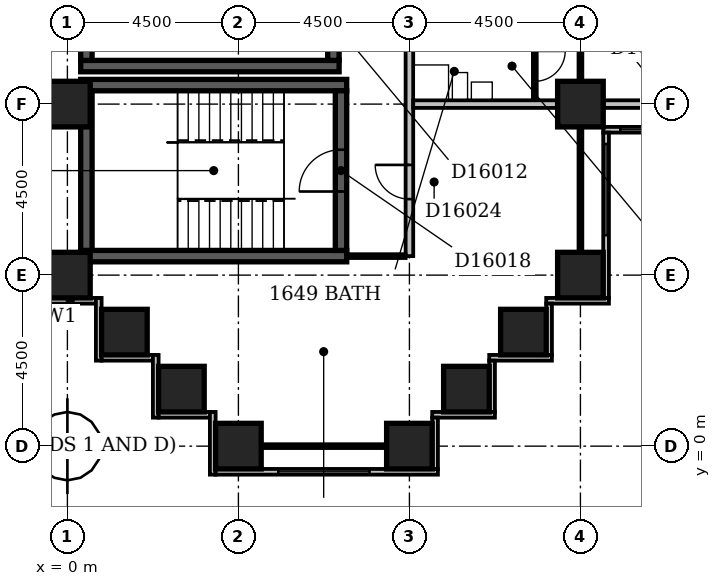
"""IFC4 building model, lengths in metres.
Left out: names, types, materials, properties, quantities, classifications, styles, units other than length and angle.
Written with IfcOpenShell. Run it as: python <this file> out.ifc"""

import sys

from ifc_helpers import new_model, si_unit, direction, frame, frame_2d, origin, origin_2d, place, context, subcontext, project, spatial, rectangle, extrude, element, fill, save


model = new_model("IFC4")
c1 = context("Model", 3, precision=1e-05, world=origin(), true_north=direction((0.0, 1.0)))
c2 = subcontext(c1, "Body", "Model", "MODEL_VIEW")
j1 = project(units=[si_unit("LENGTHUNIT", "METRE"), si_unit("PLANEANGLEUNIT", "RADIAN")], contexts=[c1])
p1 = place(None, origin())
s1 = spatial("IfcSite", under=j1, at=p1, CompositionType="ELEMENT")
p2 = place(p1, origin())
s2 = spatial("IfcBuilding", under=s1, at=p2, CompositionType="ELEMENT")
p3 = place(p2, frame((0.0, 0.0, 68.6)))
s3 = spatial("IfcBuildingStorey", under=s2, at=p3, CompositionType="ELEMENT", Elevation=68.6)
for number, where, z_axis, x_axis in (
    (1, (0.35, 5.0, -0.3), (0.0, 0.0, 1.0), (1.0, 0.0, 0.0)),
    (2, (0.35, 9.5, -0.3), (0.0, 0.0, 1.0), (1.0, 0.0, 0.0)),
):
    element("IfcWall", number, at=place(p3, frame(where, z_axis=z_axis, x_axis=x_axis)), inside=s3, PredefinedType="SHEAR", context=c2, shape_type="SweptSolid", body=[
        extrude(rectangle(XDim=7.0, YDim=0.3, at=frame_2d((3.5, 0.0))), origin(), (0.0, 0.0, 1.0), 3.6),
    ])
p4 = place(p3, frame((0.35, 10.0, -0.3), z_axis=(0.0, 0.0, 1.0), x_axis=(1.0, 0.0, 0.0)))
e3 = element("IfcWall", 3, at=p4, inside=s3, PredefinedType="SHEAR", context=c2, shape_type="SweptSolid", body=[
    extrude(rectangle(XDim=6.8, YDim=0.3, at=frame_2d((3.4, 0.0))), origin(), (0.0, 0.0, 1.0), 3.6),
])
p5 = place(p3, frame((0.5, 5.15, -0.3), z_axis=(0.0, 0.0, 1.0), x_axis=(0.0, 1.0, 0.0)))
e4 = element("IfcWall", 4, at=p5, inside=s3, PredefinedType="SHEAR", context=c2, shape_type="SweptSolid", body=[
    extrude(rectangle(XDim=4.2, YDim=0.3, at=frame_2d((2.1, 0.0))), origin(), (0.0, 0.0, 1.0), 3.6),
])
p6 = place(p3, frame((0.5, 10.15, -0.3), z_axis=(0.0, 0.0, 1.0), x_axis=(0.0, 1.0, 0.0)))
e5 = element("IfcWall", 5, at=p6, inside=s3, PredefinedType="SHEAR", context=c2, shape_type="SweptSolid", body=[
    extrude(rectangle(XDim=3.7, YDim=0.3, at=frame_2d((1.85, 0.0))), origin(), (0.0, 0.0, 1.0), 3.6),
])
p7 = place(p3, frame((7.0, 10.15, -0.3), z_axis=(0.0, 0.0, 1.0), x_axis=(0.0, 1.0, 0.0)))
e6 = element("IfcWall", 6, at=p7, inside=s3, PredefinedType="SHEAR", context=c2, shape_type="SweptSolid", body=[
    extrude(rectangle(XDim=3.7, YDim=0.3, at=frame_2d((1.85, 0.0))), origin(), (0.0, 0.0, 1.0), 3.6),
])
p8 = place(p7, frame((1.35, 0.0, 0.3)))
e7 = element("IfcOpeningElement", 7, at=p8, cuts=e6, PredefinedType="OPENING", context=c2, shape_type="SweptSolid", body=[
    extrude(rectangle(XDim=1.0, YDim=2.1, at=frame_2d((0.5, 1.05))), frame((0.0, 0.162, 0.0), z_axis=(0.0, -1.0, 0.0), x_axis=(1.0, 0.0, 0.0)), (0.0, 0.0, 1.0), 0.324),
])
p9 = place(p3, frame((7.2, 5.15, -0.3), z_axis=(0.0, 0.0, 1.0), x_axis=(0.0, 1.0, 0.0)))
e8 = element("IfcWall", 8, at=p9, inside=s3, PredefinedType="SHEAR", context=c2, shape_type="SweptSolid", body=[
    extrude(rectangle(XDim=4.2, YDim=0.3, at=frame_2d((2.1, 0.0))), origin(), (0.0, 0.0, 1.0), 3.6),
])
p10 = place(p9, frame((1.55, 0.0, 0.3)))
e9 = element("IfcOpeningElement", 9, at=p10, cuts=e8, PredefinedType="OPENING", context=c2, shape_type="SweptSolid", body=[
    extrude(rectangle(XDim=1.1, YDim=2.1, at=frame_2d((0.55, 1.05))), frame((0.0, 0.162, 0.0), z_axis=(0.0, -1.0, 0.0), x_axis=(1.0, 0.0, 0.0)), (0.0, 0.0, 1.0), 0.324),
])
for number, where, z_axis, x_axis in (
    (10, (4.5, 0.0, -0.3), (0.0, 0.0, 1.0), (1.0, 0.0, 0.0)),
    (11, (9.0, 0.0, -0.3), (0.0, 0.0, 1.0), (1.0, 0.0, 0.0)),
    (12, (3.0, 1.5, -0.3), (0.0, 0.0, 1.0), (1.0, 0.0, 0.0)),
    (13, (10.5, 1.5, -0.3), (0.0, 0.0, 1.0), (1.0, 0.0, 0.0)),
    (14, (1.5, 3.0, -0.3), (0.0, 0.0, 1.0), (1.0, 0.0, 0.0)),
    (15, (12.0, 3.0, -0.3), (0.0, 0.0, 1.0), (1.0, 0.0, 0.0)),
    (16, (0.0, 4.5, -0.3), (0.0, 0.0, 1.0), (1.0, 0.0, 0.0)),
    (17, (13.5, 4.5, -0.3), (0.0, 0.0, 1.0), (1.0, 0.0, 0.0)),
    (18, (0.0, 9.0, -0.3), (0.0, 0.0, 1.0), (1.0, 0.0, 0.0)),
    (19, (13.5, 9.0, -0.3), (0.0, 0.0, 1.0), (1.0, 0.0, 0.0)),
):
    element("IfcColumn", number, at=place(p3, frame(where, z_axis=z_axis, x_axis=x_axis)), inside=s3, PredefinedType="COLUMN", context=c2, shape_type="SweptSolid", body=[
        extrude(rectangle(XDim=1.2, YDim=1.2, at=origin_2d()), origin(), (0.0, 0.0, 1.0), 3.6),
    ])
p11 = place(p3, frame((9.675, -0.6, 0.0), z_axis=(0.0, 0.0, 1.0), x_axis=(0.0, 1.0, 0.0)))
e20 = element("IfcWall", 20, at=p11, inside=s3, PredefinedType="STANDARD", context=c2, shape_type="SweptSolid", body=[
    extrude(rectangle(XDim=1.35, YDim=0.15, at=frame_2d((0.675, 0.0))), origin(), (0.0, 0.0, 1.0), 2.7),
])
p12 = place(p3, frame((9.6, 0.825, 0.0), z_axis=(0.0, 0.0, 1.0), x_axis=(1.0, 0.0, 0.0)))
e21 = element("IfcWall", 21, at=p12, inside=s3, PredefinedType="STANDARD", context=c2, shape_type="SweptSolid", body=[
    extrude(rectangle(XDim=1.65, YDim=0.15, at=frame_2d((0.825, 0.0))), origin(), (0.0, 0.0, 1.0), 2.7),
])
p13 = place(p3, frame((11.175, 0.9, 0.0), z_axis=(0.0, 0.0, 1.0), x_axis=(0.0, 1.0, 0.0)))
e22 = element("IfcWall", 22, at=p13, inside=s3, PredefinedType="STANDARD", context=c2, shape_type="SweptSolid", body=[
    extrude(rectangle(XDim=1.35, YDim=0.15, at=frame_2d((0.675, 0.0))), origin(), (0.0, 0.0, 1.0), 2.7),
])
p14 = place(p3, frame((11.1, 2.325, 0.0), z_axis=(0.0, 0.0, 1.0), x_axis=(1.0, 0.0, 0.0)))
e23 = element("IfcWall", 23, at=p14, inside=s3, PredefinedType="STANDARD", context=c2, shape_type="SweptSolid", body=[
    extrude(rectangle(XDim=1.65, YDim=0.15, at=frame_2d((0.825, 0.0))), origin(), (0.0, 0.0, 1.0), 2.7),
])
p15 = place(p3, frame((12.675, 2.4, 0.0), z_axis=(0.0, 0.0, 1.0), x_axis=(0.0, 1.0, 0.0)))
e24 = element("IfcWall", 24, at=p15, inside=s3, PredefinedType="STANDARD", context=c2, shape_type="SweptSolid", body=[
    extrude(rectangle(XDim=1.35, YDim=0.15, at=frame_2d((0.675, 0.0))), origin(), (0.0, 0.0, 1.0), 2.7),
])
p16 = place(p3, frame((12.6, 3.825, 0.0), z_axis=(0.0, 0.0, 1.0), x_axis=(1.0, 0.0, 0.0)))
e25 = element("IfcWall", 25, at=p16, inside=s3, PredefinedType="STANDARD", context=c2, shape_type="SweptSolid", body=[
    extrude(rectangle(XDim=1.65, YDim=0.15, at=frame_2d((0.825, 0.0))), origin(), (0.0, 0.0, 1.0), 2.7),
])
p17 = place(p3, frame((14.175, 3.9, 0.0), z_axis=(0.0, 0.0, 1.0), x_axis=(0.0, 1.0, 0.0)))
e26 = element("IfcWall", 26, at=p17, inside=s3, PredefinedType="STANDARD", context=c2, shape_type="SweptSolid", body=[
    extrude(rectangle(XDim=4.35, YDim=0.15, at=frame_2d((2.175, 0.0))), origin(), (0.0, 0.0, 1.0), 2.7),
])
p18 = place(p17, frame((1.65, 0.0, 0.6)))
e27 = element("IfcOpeningElement", 27, at=p18, cuts=e26, PredefinedType="OPENING", context=c2, shape_type="SweptSolid", body=[
    extrude(rectangle(XDim=2.4, YDim=1.8, at=frame_2d((1.2, 0.9))), frame((0.0, 0.087, 0.0), z_axis=(0.0, -1.0, 0.0), x_axis=(1.0, 0.0, 0.0)), (0.0, 0.0, 1.0), 0.174),
])
p19 = place(p3, frame((14.1, 8.325, 0.0), z_axis=(0.0, 0.0, 1.0), x_axis=(1.0, 0.0, 0.0)))
e28 = element("IfcWall", 28, at=p19, inside=s3, PredefinedType="STANDARD", context=c2, shape_type="SweptSolid", body=[
    extrude(rectangle(XDim=4.65, YDim=0.15, at=frame_2d((2.325, 0.0))), origin(), (0.0, 0.0, 1.0), 2.7),
])
p20 = place(p19, frame((0.45, 0.0, 0.6)))
e29 = element("IfcOpeningElement", 29, at=p20, cuts=e28, PredefinedType="OPENING", context=c2, shape_type="SweptSolid", body=[
    extrude(rectangle(XDim=2.4, YDim=1.8, at=frame_2d((1.2, 0.9))), frame((0.0, 0.087, 0.0), z_axis=(0.0, -1.0, 0.0), x_axis=(1.0, 0.0, 0.0)), (0.0, 0.0, 1.0), 0.174),
])
p21 = place(p3, frame((-0.6, 3.825, 0.0), z_axis=(0.0, 0.0, 1.0), x_axis=(1.0, 0.0, 0.0)))
e30 = element("IfcWall", 30, at=p21, inside=s3, PredefinedType="STANDARD", context=c2, shape_type="SweptSolid", body=[
    extrude(rectangle(XDim=1.35, YDim=0.15, at=frame_2d((0.675, 0.0))), origin(), (0.0, 0.0, 1.0), 2.7),
])
p22 = place(p3, frame((0.825, 3.9, 0.0), z_axis=(0.0, 0.0, 1.0), x_axis=(0.0, -1.0, 0.0)))
e31 = element("IfcWall", 31, at=p22, inside=s3, PredefinedType="STANDARD", context=c2, shape_type="SweptSolid", body=[
    extrude(rectangle(XDim=1.65, YDim=0.15, at=frame_2d((0.825, 0.0))), origin(), (0.0, 0.0, 1.0), 2.7),
])
p23 = place(p3, frame((0.9, 2.325, 0.0), z_axis=(0.0, 0.0, 1.0), x_axis=(1.0, 0.0, 0.0)))
e32 = element("IfcWall", 32, at=p23, inside=s3, PredefinedType="STANDARD", context=c2, shape_type="SweptSolid", body=[
    extrude(rectangle(XDim=1.35, YDim=0.15, at=frame_2d((0.675, 0.0))), origin(), (0.0, 0.0, 1.0), 2.7),
])
p24 = place(p3, frame((2.325, 2.4, 0.0), z_axis=(0.0, 0.0, 1.0), x_axis=(0.0, -1.0, 0.0)))
e33 = element("IfcWall", 33, at=p24, inside=s3, PredefinedType="STANDARD", context=c2, shape_type="SweptSolid", body=[
    extrude(rectangle(XDim=1.65, YDim=0.15, at=frame_2d((0.825, 0.0))), origin(), (0.0, 0.0, 1.0), 2.7),
])
p25 = place(p3, frame((2.4, 0.825, 0.0), z_axis=(0.0, 0.0, 1.0), x_axis=(1.0, 0.0, 0.0)))
e34 = element("IfcWall", 34, at=p25, inside=s3, PredefinedType="STANDARD", context=c2, shape_type="SweptSolid", body=[
    extrude(rectangle(XDim=1.35, YDim=0.15, at=frame_2d((0.675, 0.0))), origin(), (0.0, 0.0, 1.0), 2.7),
])
p26 = place(p3, frame((3.825, 0.9, 0.0), z_axis=(0.0, 0.0, 1.0), x_axis=(0.0, -1.0, 0.0)))
e35 = element("IfcWall", 35, at=p26, inside=s3, PredefinedType="STANDARD", context=c2, shape_type="SweptSolid", body=[
    extrude(rectangle(XDim=1.65, YDim=0.15, at=frame_2d((0.825, 0.0))), origin(), (0.0, 0.0, 1.0), 2.7),
])
p27 = place(p3, frame((3.9, -0.675, 0.0), z_axis=(0.0, 0.0, 1.0), x_axis=(1.0, 0.0, 0.0)))
e36 = element("IfcWall", 36, at=p27, inside=s3, PredefinedType="STANDARD", context=c2, shape_type="SweptSolid", body=[
    extrude(rectangle(XDim=5.85, YDim=0.15, at=frame_2d((2.925, 0.0))), origin(), (0.0, 0.0, 1.0), 2.7),
])
p28 = place(p27, frame((1.65, 0.0, 0.6)))
e37 = element("IfcOpeningElement", 37, at=p28, cuts=e36, PredefinedType="OPENING", context=c2, shape_type="SweptSolid", body=[
    extrude(rectangle(XDim=2.4, YDim=1.8, at=frame_2d((1.2, 0.9))), frame((0.0, 0.087, 0.0), z_axis=(0.0, -1.0, 0.0), x_axis=(1.0, 0.0, 0.0)), (0.0, 0.0, 1.0), 0.174),
])
p29 = place(p3, frame((5.1, 0.0, 0.0), z_axis=(0.0, 0.0, 1.0), x_axis=(1.0, 0.0, 0.0)))
e38 = element("IfcWall", 38, at=p29, inside=s3, PredefinedType="PARTITIONING", context=c2, shape_type="SweptSolid", body=[
    extrude(rectangle(XDim=3.3, YDim=0.1, at=frame_2d((1.65, 0.0))), origin(), (0.0, 0.0, 1.0), 2.7),
])
p30 = place(p3, frame((0.0, 4.4, 0.0), z_axis=(0.0, 0.0, 1.0), x_axis=(0.0, 1.0, 0.0)))
e39 = element("IfcWall", 39, at=p30, inside=s3, PredefinedType="PARTITIONING", context=c2, shape_type="SweptSolid", body=[
    extrude(rectangle(XDim=0.7, YDim=0.1, at=frame_2d((0.35, 0.0))), origin(), (0.0, 0.0, 1.0), 2.7),
])
p31 = place(p3, frame((7.349, 5.0, 0.0), z_axis=(0.0, 0.0, 1.0), x_axis=(1.0, 0.0, 0.0)))
e40 = element("IfcWall", 40, at=p31, inside=s3, PredefinedType="PARTITIONING", context=c2, shape_type="SweptSolid", body=[
    extrude(rectangle(XDim=1.551, YDim=0.1, at=frame_2d((0.775, 0.0))), origin(), (0.0, 0.0, 1.0), 3.3),
])
p32 = place(p3, frame((9.0, 5.0, 0.0), z_axis=(0.0, 0.0, 1.0), x_axis=(0.0, 1.0, 0.0)))
e41 = element("IfcWall", 41, at=p32, inside=s3, PredefinedType="PARTITIONING", context=c2, shape_type="SweptSolid", body=[
    extrude(rectangle(XDim=44.5, YDim=0.2, at=frame_2d((22.25, 0.0))), origin(), (0.0, 0.0, 1.0), 3.3),
])
p33 = place(p32, frame((22.3, 0.0, 0.0)))
e42 = element("IfcOpeningElement", 42, at=p33, cuts=e41, PredefinedType="OPENING", context=c2, shape_type="SweptSolid", body=[
    extrude(rectangle(XDim=1.0, YDim=2.1, at=frame_2d((0.5, 1.05))), frame((0.0, 0.112, 0.0), z_axis=(0.0, -1.0, 0.0), x_axis=(1.0, 0.0, 0.0)), (0.0, 0.0, 1.0), 0.224),
])
p34 = place(p32, frame((15.7, 0.0, 0.0)))
e43 = element("IfcOpeningElement", 43, at=p34, cuts=e41, PredefinedType="OPENING", context=c2, shape_type="SweptSolid", body=[
    extrude(rectangle(XDim=1.0, YDim=2.1, at=frame_2d((0.5, 1.05))), frame((0.0, 0.112, 0.0), z_axis=(0.0, -1.0, 0.0), x_axis=(1.0, 0.0, 0.0)), (0.0, 0.0, 1.0), 0.224),
])
p35 = place(p32, frame((10.45, 0.0, 0.0)))
e44 = element("IfcOpeningElement", 44, at=p35, cuts=e41, PredefinedType="OPENING", context=c2, shape_type="SweptSolid", body=[
    extrude(rectangle(XDim=1.0, YDim=2.1, at=frame_2d((0.5, 1.05))), frame((0.0, 0.112, 0.0), z_axis=(0.0, -1.0, 0.0), x_axis=(1.0, 0.0, 0.0)), (0.0, 0.0, 1.0), 0.224),
])
p36 = place(p32, frame((5.95, 0.0, 0.0)))
e45 = element("IfcOpeningElement", 45, at=p36, cuts=e41, PredefinedType="OPENING", context=c2, shape_type="SweptSolid", body=[
    extrude(rectangle(XDim=1.0, YDim=2.1, at=frame_2d((0.5, 1.05))), frame((0.0, 0.112, 0.0), z_axis=(0.0, -1.0, 0.0), x_axis=(1.0, 0.0, 0.0)), (0.0, 0.0, 1.0), 0.224),
])
p37 = place(p32, frame((37.25, 0.0, 0.0)))
e46 = element("IfcOpeningElement", 46, at=p37, cuts=e41, PredefinedType="OPENING", context=c2, shape_type="SweptSolid", body=[
    extrude(rectangle(XDim=0.9, YDim=2.1, at=frame_2d((0.45, 1.05))), frame((0.0, 0.112, 0.0), z_axis=(0.0, -1.0, 0.0), x_axis=(1.0, 0.0, 0.0)), (0.0, 0.0, 1.0), 0.224),
])
p38 = place(p32, frame((1.5, 0.0, 0.0)))
e47 = element("IfcOpeningElement", 47, at=p38, cuts=e41, PredefinedType="OPENING", context=c2, shape_type="SweptSolid", body=[
    extrude(rectangle(XDim=0.9, YDim=2.1, at=frame_2d((0.45, 1.05))), frame((0.0, 0.112, 0.0), z_axis=(0.0, -1.0, 0.0), x_axis=(1.0, 0.0, 0.0)), (0.0, 0.0, 1.0), 0.224),
])
p39 = place(p3, frame((13.5, 5.1, 0.0), z_axis=(0.0, 0.0, 1.0), x_axis=(0.0, 1.0, 0.0)))
e48 = element("IfcWall", 48, at=p39, inside=s3, PredefinedType="PARTITIONING", context=c2, shape_type="SweptSolid", body=[
    extrude(rectangle(XDim=3.3, YDim=0.1, at=frame_2d((1.65, 0.0))), origin(), (0.0, 0.0, 1.0), 2.7),
])
p40 = place(p3, frame((9.1, 9.0, 0.0), z_axis=(0.0, 0.0, 1.0), x_axis=(1.0, 0.0, 0.0)))
e49 = element("IfcWall", 49, at=p40, inside=s3, PredefinedType="PARTITIONING", context=c2, shape_type="SweptSolid", body=[
    extrude(rectangle(XDim=3.8, YDim=0.2, at=frame_2d((1.9, 0.0))), origin(), (0.0, 0.0, 1.0), 3.3),
])
p41 = place(p3, frame((14.1, 9.0, 0.0), z_axis=(0.0, 0.0, 1.0), x_axis=(1.0, 0.0, 0.0)))
e50 = element("IfcWall", 50, at=p41, inside=s3, PredefinedType="PARTITIONING", context=c2, shape_type="SweptSolid", body=[
    extrude(rectangle(XDim=3.3, YDim=0.2, at=frame_2d((1.65, 0.0))), origin(), (0.0, 0.0, 1.0), 2.7),
])
p42 = place(p3, frame((12.3, 9.1, 0.0), z_axis=(0.0, 0.0, 1.0), x_axis=(0.0, 1.0, 0.0)))
e51 = element("IfcWall", 51, at=p42, inside=s3, PredefinedType="PARTITIONING", context=c2, shape_type="SweptSolid", body=[
    extrude(rectangle(XDim=1.6, YDim=0.1, at=frame_2d((0.8, 0.0))), origin(), (0.0, 0.0, 1.0), 3.3),
])
p43 = place(p42, frame((0.5, 0.0, 0.0)))
e52 = element("IfcOpeningElement", 52, at=p43, cuts=e51, PredefinedType="OPENING", context=c2, shape_type="SweptSolid", body=[
    extrude(rectangle(XDim=0.8, YDim=2.1, at=frame_2d((0.4, 1.05))), frame((0.0, 0.062, 0.0), z_axis=(0.0, -1.0, 0.0), x_axis=(1.0, 0.0, 0.0)), (0.0, 0.0, 1.0), 0.124),
])
p44 = place(p3, frame((13.5, 9.6, 0.0), z_axis=(0.0, 0.0, 1.0), x_axis=(0.0, 1.0, 0.0)))
e53 = element("IfcWall", 53, at=p44, inside=s3, PredefinedType="PARTITIONING", context=c2, shape_type="SweptSolid", body=[
    extrude(rectangle(XDim=8.3, YDim=0.1, at=frame_2d((4.15, 0.0))), origin(), (0.0, 0.0, 1.0), 3.3),
])
p45 = place(p44, frame((5.7, 0.0, 0.0)))
e54 = element("IfcOpeningElement", 54, at=p45, cuts=e53, PredefinedType="OPENING", context=c2, shape_type="SweptSolid", body=[
    extrude(rectangle(XDim=0.9, YDim=2.1, at=frame_2d((0.45, 1.05))), frame((0.0, 0.062, 0.0), z_axis=(0.0, -1.0, 0.0), x_axis=(1.0, 0.0, 0.0)), (0.0, 0.0, 1.0), 0.124),
])
p46 = place(p44, frame((1.2, 0.0, 0.0)))
e55 = element("IfcOpeningElement", 55, at=p46, cuts=e53, PredefinedType="OPENING", context=c2, shape_type="SweptSolid", body=[
    extrude(rectangle(XDim=0.9, YDim=2.1, at=frame_2d((0.45, 1.05))), frame((0.0, 0.062, 0.0), z_axis=(0.0, -1.0, 0.0), x_axis=(1.0, 0.0, 0.0)), (0.0, 0.0, 1.0), 0.124),
])
p47 = place(p18, origin())
e56 = element("IfcWindow", 56, at=p47, inside=s3, PartitioningType="SINGLE_PANEL", PredefinedType="WINDOW", context=c2, shape_type="SweptSolid", body=[
    extrude(rectangle(XDim=2.4, YDim=1.8, at=frame_2d((1.2, 0.9))), frame((0.0, 0.03, 0.0), z_axis=(0.0, -1.0, 0.0), x_axis=(1.0, 0.0, 0.0)), (0.0, 0.0, 1.0), 0.06),
])
fill(e27, e56)
p48 = place(p20, origin())
e57 = element("IfcWindow", 57, at=p48, inside=s3, PartitioningType="SINGLE_PANEL", PredefinedType="WINDOW", context=c2, shape_type="SweptSolid", body=[
    extrude(rectangle(XDim=2.4, YDim=1.8, at=frame_2d((1.2, 0.9))), frame((0.0, 0.03, 0.0), z_axis=(0.0, -1.0, 0.0), x_axis=(1.0, 0.0, 0.0)), (0.0, 0.0, 1.0), 0.06),
])
fill(e29, e57)
p49 = place(p28, origin())
e58 = element("IfcWindow", 58, at=p49, inside=s3, PartitioningType="SINGLE_PANEL", PredefinedType="WINDOW", context=c2, shape_type="SweptSolid", body=[
    extrude(rectangle(XDim=2.4, YDim=1.8, at=frame_2d((1.2, 0.9))), frame((0.0, 0.03, 0.0), z_axis=(0.0, -1.0, 0.0), x_axis=(1.0, 0.0, 0.0)), (0.0, 0.0, 1.0), 0.06),
])
fill(e37, e58)
p50 = place(p10, origin())
e59 = element("IfcDoor", 59, at=p50, inside=s3, OperationType="SINGLE_SWING_LEFT", PredefinedType="DOOR", context=c2, shape_type="SweptSolid", body=[
    extrude(rectangle(XDim=1.1, YDim=2.1, at=frame_2d((0.55, 1.05))), frame((0.0, 0.025, 0.0), z_axis=(0.0, -1.0, 0.0), x_axis=(1.0, 0.0, 0.0)), (0.0, 0.0, 1.0), 0.05),
])
fill(e9, e59)
p51 = place(p38, frame((0.9, 0.0, 0.0), z_axis=(0.0, 0.0, 1.0), x_axis=(-1.0, 0.0, 0.0)))
e60 = element("IfcDoor", 60, at=p51, inside=s3, OperationType="SINGLE_SWING_LEFT", PredefinedType="DOOR", context=c2, shape_type="SweptSolid", body=[
    extrude(rectangle(XDim=0.9, YDim=2.1, at=frame_2d((0.45, 1.05))), frame((0.0, 0.025, 0.0), z_axis=(0.0, -1.0, 0.0), x_axis=(1.0, 0.0, 0.0)), (0.0, 0.0, 1.0), 0.05),
])
fill(e47, e60)
p52 = place(p43, origin())
e61 = element("IfcDoor", 61, at=p52, inside=s3, OperationType="SINGLE_SWING_RIGHT", PredefinedType="DOOR", context=c2, shape_type="SweptSolid", body=[
    extrude(rectangle(XDim=0.8, YDim=2.1, at=frame_2d((0.4, 1.05))), frame((0.0, 0.025, 0.0), z_axis=(0.0, -1.0, 0.0), x_axis=(1.0, 0.0, 0.0)), (0.0, 0.0, 1.0), 0.05),
])
fill(e52, e61)
save(model, sys.argv[1])
